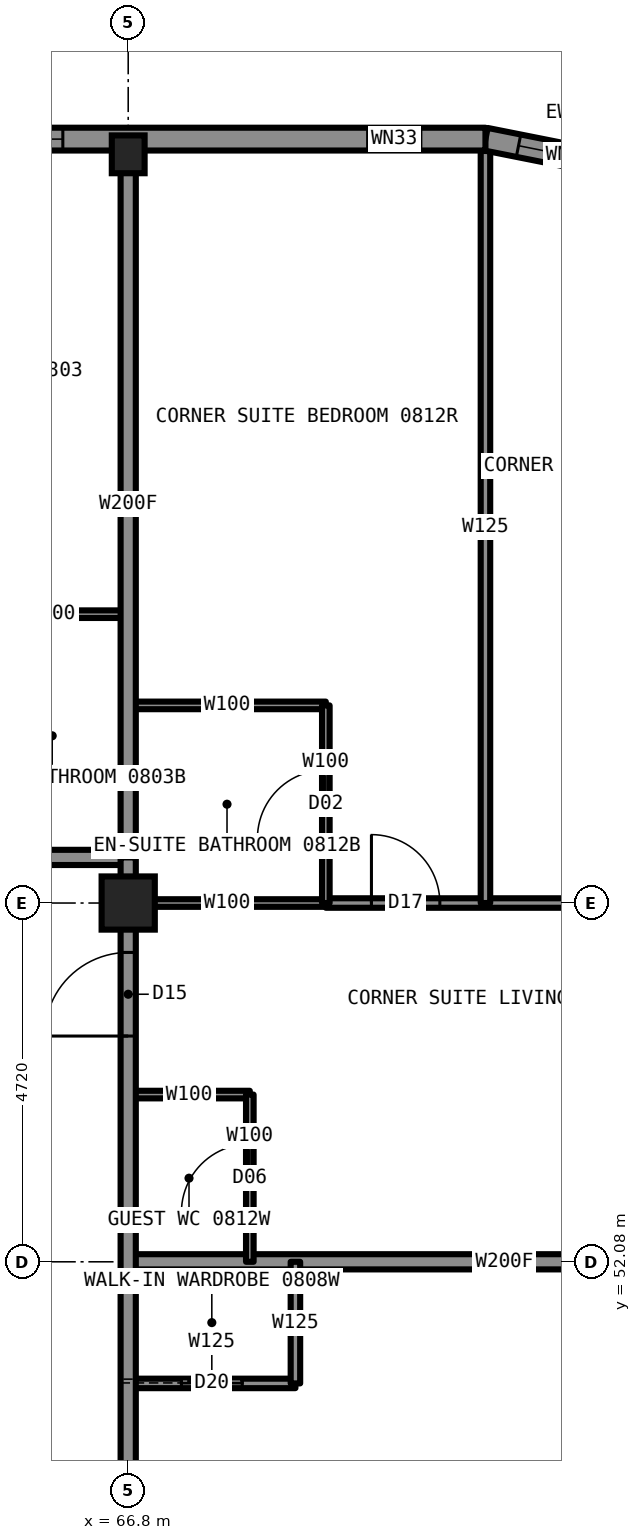
"""IFC4 building model, lengths in metres.
Left out: names, types, materials, properties, quantities, classifications, styles, units other than length and angle.
Written with IfcOpenShell. Run it as: python <this file> out.ifc"""

import sys

from ifc_helpers import new_model, si_unit, direction, frame, frame_2d, origin, origin_2d, place, context, subcontext, project, spatial, rectangle, hollow_rectangle, i_section, extrude, element, fill, save


model = new_model("IFC4")
c1 = context("Model", 3, precision=1e-05, world=origin(), true_north=direction((0.0, 1.0)))
c2 = subcontext(c1, "Body", "Model", "MODEL_VIEW")
j1 = project(units=[si_unit("LENGTHUNIT", "METRE"), si_unit("PLANEANGLEUNIT", "RADIAN")], contexts=[c1])
p1 = place(None, origin())
s1 = spatial("IfcSite", under=j1, at=p1, CompositionType="ELEMENT")
p2 = place(p1, origin())
s2 = spatial("IfcBuilding", under=s1, at=p2, CompositionType="ELEMENT")
p3 = place(p2, frame((0.0, 0.0, 28.5)))
s3 = spatial("IfcBuildingStorey", under=s2, at=p3, CompositionType="ELEMENT", Elevation=28.5)
p4 = place(p3, frame((66.8, 66.65, 0.0), z_axis=(0.0, 0.0, 1.0), x_axis=(1.0, 0.0, 0.0)))
e1 = element("IfcColumn", 1, at=p4, inside=s3, PredefinedType="COLUMN", context=c2, shape_type="SweptSolid", body=[
    extrude(i_section(OverallWidth=0.432, OverallDepth=0.498, WebThickness=0.056, FlangeThickness=0.089, at=origin_2d()), origin(), (0.0, 0.0, 1.0), 3.5),
])
p5 = place(p3, frame((66.8, 56.8, 0.0), z_axis=(0.0, 0.0, 1.0), x_axis=(1.0, 0.0, 0.0)))
e2 = element("IfcColumn", 2, at=p5, inside=s3, PredefinedType="COLUMN", context=c2, shape_type="SweptSolid", body=[
    extrude(hollow_rectangle(XDim=0.7, YDim=0.7, WallThickness=0.06, at=origin_2d()), origin(), (0.0, 0.0, 1.0), 3.5),
])
p6 = place(p3, frame((66.8, 56.8, 0.0), z_axis=(0.0, 0.0, 1.0), x_axis=(1.0, 0.0, 0.0)))
e3 = element("IfcWall", 3, at=p6, inside=s3, PredefinedType="PARTITIONING", context=c2, shape_type="SweptSolid", body=[
    extrude(rectangle(XDim=2.6, YDim=0.1, at=frame_2d((1.3, 0.0))), origin(), (0.0, 0.0, 1.0), 2.573),
])
p7 = place(p3, frame((69.4, 56.8, 0.0), z_axis=(0.0, 0.0, 1.0), x_axis=(1.0, 0.0, 0.0)))
e4 = element("IfcWall", 4, at=p7, inside=s3, PredefinedType="PARTITIONING", context=c2, shape_type="SweptSolid", body=[
    extrude(rectangle(XDim=7.3, YDim=0.125, at=frame_2d((3.65, 0.0))), origin(), (0.0, 0.0, 1.0), 2.573),
])
p8 = place(p7, frame((0.6, 0.0, 0.0)))
e5 = element("IfcOpeningElement", 5, at=p8, cuts=e4, PredefinedType="OPENING", context=c2, shape_type="SweptSolid", body=[
    extrude(rectangle(XDim=0.9, YDim=2.2, at=frame_2d((0.45, 1.1))), frame((0.0, 0.073, 0.0), z_axis=(0.0, -1.0, 0.0), x_axis=(1.0, 0.0, 0.0)), (0.0, 0.0, 1.0), 0.145),
])
p9 = place(p7, frame((4.4, 0.0, 0.0)))
e6 = element("IfcOpeningElement", 6, at=p9, cuts=e4, PredefinedType="OPENING", context=c2, shape_type="SweptSolid", body=[
    extrude(rectangle(XDim=0.9, YDim=2.2, at=frame_2d((0.45, 1.1))), frame((0.0, 0.073, 0.0), z_axis=(0.0, -1.0, 0.0), x_axis=(1.0, 0.0, 0.0)), (0.0, 0.0, 1.0), 0.145),
])
p10 = place(p3, frame((43.2, 57.4, 0.0), z_axis=(0.0, 0.0, 1.0), x_axis=(1.0, 0.0, 0.0)))
e7 = element("IfcWall", 7, at=p10, inside=s3, PredefinedType="PARTITIONING", context=c2, shape_type="SweptSolid", body=[
    extrude(rectangle(XDim=23.6, YDim=0.2, at=frame_2d((11.8, 0.0))), origin(), (0.0, 0.0, 1.0), 3.33),
])
p11 = place(p10, frame((1.85, 0.0, 0.0)))
e8 = element("IfcOpeningElement", 8, at=p11, cuts=e7, PredefinedType="OPENING", context=c2, shape_type="SweptSolid", body=[
    extrude(rectangle(XDim=1.1, YDim=2.2, at=frame_2d((0.55, 1.1))), frame((0.0, 0.11, 0.0), z_axis=(0.0, -1.0, 0.0), x_axis=(1.0, 0.0, 0.0)), (0.0, 0.0, 1.0), 0.22),
])
p12 = place(p10, frame((15.62, 0.0, 0.0)))
e9 = element("IfcOpeningElement", 9, at=p12, cuts=e7, PredefinedType="OPENING", context=c2, shape_type="SweptSolid", body=[
    extrude(rectangle(XDim=1.0, YDim=2.2, at=frame_2d((0.5, 1.1))), frame((0.0, 0.11, 0.0), z_axis=(0.0, -1.0, 0.0), x_axis=(1.0, 0.0, 0.0)), (0.0, 0.0, 1.0), 0.22),
])
p13 = place(p10, frame((20.34, 0.0, 0.0)))
e10 = element("IfcOpeningElement", 10, at=p13, cuts=e7, PredefinedType="OPENING", context=c2, shape_type="SweptSolid", body=[
    extrude(rectangle(XDim=1.0, YDim=2.2, at=frame_2d((0.5, 1.1))), frame((0.0, 0.11, 0.0), z_axis=(0.0, -1.0, 0.0), x_axis=(1.0, 0.0, 0.0)), (0.0, 0.0, 1.0), 0.22),
])
p14 = place(p3, frame((66.8, 59.4, 0.0), z_axis=(0.0, 0.0, 1.0), x_axis=(1.0, 0.0, 0.0)))
e11 = element("IfcWall", 11, at=p14, inside=s3, PredefinedType="PARTITIONING", context=c2, shape_type="SweptSolid", body=[
    extrude(rectangle(XDim=2.6, YDim=0.1, at=frame_2d((1.3, 0.0))), origin(), (0.0, 0.0, 1.0), 3.33),
])
p15 = place(p3, frame((64.8, 60.6, 0.0), z_axis=(0.0, 0.0, 1.0), x_axis=(1.0, 0.0, 0.0)))
e12 = element("IfcWall", 12, at=p15, inside=s3, PredefinedType="PARTITIONING", context=c2, shape_type="SweptSolid", body=[
    extrude(rectangle(XDim=2.0, YDim=0.1, at=frame_2d((1.0, 0.0))), origin(), (0.0, 0.0, 1.0), 3.33),
])
p16 = place(p3, frame((66.8, 50.48, 0.0), z_axis=(0.0, 0.0, 1.0), x_axis=(1.0, 0.0, 0.0)))
e13 = element("IfcWall", 13, at=p16, inside=s3, PredefinedType="PARTITIONING", context=c2, shape_type="SweptSolid", body=[
    extrude(rectangle(XDim=2.2, YDim=0.125, at=frame_2d((1.1, 0.0))), origin(), (0.0, 0.0, 1.0), 3.33),
])
p17 = place(p16, frame((0.7, 0.0, 0.0)))
e14 = element("IfcOpeningElement", 14, at=p17, cuts=e13, PredefinedType="OPENING", context=c2, shape_type="SweptSolid", body=[
    extrude(rectangle(XDim=0.8, YDim=2.1, at=frame_2d((0.4, 1.05))), frame((0.0, 0.073, 0.0), z_axis=(0.0, -1.0, 0.0), x_axis=(1.0, 0.0, 0.0)), (0.0, 0.0, 1.0), 0.145),
])
p18 = place(p3, frame((66.8, 52.08, 0.0), z_axis=(0.0, 0.0, 1.0), x_axis=(1.0, 0.0, 0.0)))
e15 = element("IfcWall", 15, at=p18, inside=s3, PredefinedType="PARTITIONING", context=c2, shape_type="SweptSolid", body=[
    extrude(rectangle(XDim=9.9, YDim=0.2, at=frame_2d((4.95, 0.0))), origin(), (0.0, 0.0, 1.0), 2.573),
])
p19 = place(p3, frame((66.8, 54.28, 0.0), z_axis=(0.0, 0.0, 1.0), x_axis=(1.0, 0.0, 0.0)))
e16 = element("IfcWall", 16, at=p19, inside=s3, PredefinedType="PARTITIONING", context=c2, shape_type="SweptSolid", body=[
    extrude(rectangle(XDim=1.6, YDim=0.1, at=frame_2d((0.8, 0.0))), origin(), (0.0, 0.0, 1.0), 2.723),
])
p20 = place(p3, frame((66.8, 33.22, 0.0), z_axis=(0.0, 0.0, 1.0), x_axis=(0.0, 1.0, 0.0)))
e17 = element("IfcWall", 17, at=p20, inside=s3, PredefinedType="PARTITIONING", context=c2, shape_type="SweptSolid", body=[
    extrude(rectangle(XDim=23.56, YDim=0.2, at=frame_2d((11.78, 0.0))), origin(), (0.0, 0.0, 1.0), 3.33),
])
p21 = place(p20, frame((7.85, 0.0, 0.0)))
e18 = element("IfcOpeningElement", 18, at=p21, cuts=e17, PredefinedType="OPENING", context=c2, shape_type="SweptSolid", body=[
    extrude(rectangle(XDim=1.0, YDim=2.2, at=frame_2d((0.5, 1.1))), frame((0.0, 0.11, 0.0), z_axis=(0.0, -1.0, 0.0), x_axis=(1.0, 0.0, 0.0)), (0.0, 0.0, 1.0), 0.22),
])
p22 = place(p20, frame((12.42, 0.0, 0.0)))
e19 = element("IfcOpeningElement", 19, at=p22, cuts=e17, PredefinedType="OPENING", context=c2, shape_type="SweptSolid", body=[
    extrude(rectangle(XDim=1.0, YDim=2.2, at=frame_2d((0.5, 1.1))), frame((0.0, 0.11, 0.0), z_axis=(0.0, -1.0, 0.0), x_axis=(1.0, 0.0, 0.0)), (0.0, 0.0, 1.0), 0.22),
])
p23 = place(p20, frame((21.83, 0.0, 0.0)))
e20 = element("IfcOpeningElement", 20, at=p23, cuts=e17, PredefinedType="OPENING", context=c2, shape_type="SweptSolid", body=[
    extrude(rectangle(XDim=1.1, YDim=2.2, at=frame_2d((0.55, 1.1))), frame((0.0, 0.11, 0.0), z_axis=(0.0, -1.0, 0.0), x_axis=(1.0, 0.0, 0.0)), (0.0, 0.0, 1.0), 0.22),
])
p24 = place(p20, frame((0.63, 0.0, 0.0)))
e21 = element("IfcOpeningElement", 21, at=p24, cuts=e17, PredefinedType="OPENING", context=c2, shape_type="SweptSolid", body=[
    extrude(rectangle(XDim=1.1, YDim=2.2, at=frame_2d((0.55, 1.1))), frame((0.0, 0.11, 0.0), z_axis=(0.0, -1.0, 0.0), x_axis=(1.0, 0.0, 0.0)), (0.0, 0.0, 1.0), 0.22),
])
p25 = place(p3, frame((66.8, 57.4, 0.0), z_axis=(0.0, 0.0, 1.0), x_axis=(0.0, 1.0, 0.0)))
e22 = element("IfcWall", 22, at=p25, inside=s3, PredefinedType="PARTITIONING", context=c2, shape_type="SweptSolid", body=[
    extrude(rectangle(XDim=9.3, YDim=0.2, at=frame_2d((4.65, 0.0))), origin(), (0.0, 0.0, 1.0), 2.573),
])
p26 = place(p3, frame((68.4, 52.08, 0.0), z_axis=(0.0, 0.0, 1.0), x_axis=(0.0, 1.0, 0.0)))
e23 = element("IfcWall", 23, at=p26, inside=s3, PredefinedType="PARTITIONING", context=c2, shape_type="SweptSolid", body=[
    extrude(rectangle(XDim=2.2, YDim=0.1, at=frame_2d((1.1, 0.0))), origin(), (0.0, 0.0, 1.0), 3.33),
])
p27 = place(p26, frame((0.65, 0.0, 0.0)))
e24 = element("IfcOpeningElement", 24, at=p27, cuts=e23, PredefinedType="OPENING", context=c2, shape_type="SweptSolid", body=[
    extrude(rectangle(XDim=0.9, YDim=2.1, at=frame_2d((0.45, 1.05))), frame((0.0, 0.06, 0.0), z_axis=(0.0, -1.0, 0.0), x_axis=(1.0, 0.0, 0.0)), (0.0, 0.0, 1.0), 0.12),
])
p28 = place(p3, frame((69.0, 50.48, 0.0), z_axis=(0.0, 0.0, 1.0), x_axis=(0.0, 1.0, 0.0)))
e25 = element("IfcWall", 25, at=p28, inside=s3, PredefinedType="PARTITIONING", context=c2, shape_type="SweptSolid", body=[
    extrude(rectangle(XDim=1.6, YDim=0.125, at=frame_2d((0.8, 0.0))), origin(), (0.0, 0.0, 1.0), 3.33),
])
p29 = place(p3, frame((69.4, 56.8, 0.0), z_axis=(0.0, 0.0, 1.0), x_axis=(0.0, 1.0, 0.0)))
e26 = element("IfcWall", 26, at=p29, inside=s3, PredefinedType="PARTITIONING", context=c2, shape_type="SweptSolid", body=[
    extrude(rectangle(XDim=2.6, YDim=0.1, at=frame_2d((1.3, 0.0))), origin(), (0.0, 0.0, 1.0), 3.33),
])
p30 = place(p29, frame((0.85, 0.0, 0.0)))
e27 = element("IfcOpeningElement", 27, at=p30, cuts=e26, PredefinedType="OPENING", context=c2, shape_type="SweptSolid", body=[
    extrude(rectangle(XDim=0.9, YDim=2.1, at=frame_2d((0.45, 1.05))), frame((0.0, 0.06, 0.0), z_axis=(0.0, -1.0, 0.0), x_axis=(1.0, 0.0, 0.0)), (0.0, 0.0, 1.0), 0.12),
])
p31 = place(p3, frame((71.5, 56.8, 0.0), z_axis=(0.0, 0.0, 1.0), x_axis=(0.0, 1.0, 0.0)))
e28 = element("IfcWall", 28, at=p31, inside=s3, PredefinedType="PARTITIONING", context=c2, shape_type="SweptSolid", body=[
    extrude(rectangle(XDim=9.894, YDim=0.125, at=frame_2d((4.947, 0.0))), origin(), (0.0, 0.0, 1.0), 3.33),
])
p32 = place(p3, frame((73.547, 66.443, 0.0), z_axis=(0.0, 0.0, 1.0), x_axis=(-0.980787050784, 0.195081421501, 0.0)))
e29 = element("IfcWall", 29, at=p32, inside=s3, PredefinedType="SOLIDWALL", context=c2, shape_type="SweptSolid", body=[
    extrude(rectangle(XDim=2.087, YDim=0.3, at=frame_2d((1.044, 0.0))), origin(), (0.0, 0.0, 1.0), 3.33),
])
p33 = place(p32, frame((0.844, 0.0, 0.5)))
e30 = element("IfcOpeningElement", 30, at=p33, cuts=e29, PredefinedType="OPENING", context=c2, shape_type="SweptSolid", body=[
    extrude(rectangle(XDim=0.8, YDim=1.1, at=frame_2d((0.4, 0.55))), frame((0.0, 0.16, 0.0), z_axis=(0.0, -1.0, 0.0), x_axis=(1.0, 0.0, 0.0)), (0.0, 0.0, 1.0), 0.32),
])
p34 = place(p3, frame((71.5, 66.85, 0.0), z_axis=(0.0, 0.0, 1.0), x_axis=(-1.0, 0.0, 0.0)))
e31 = element("IfcWall", 31, at=p34, inside=s3, PredefinedType="SOLIDWALL", context=c2, shape_type="SweptSolid", body=[
    extrude(rectangle(XDim=33.0, YDim=0.3, at=frame_2d((16.5, 0.0))), origin(), (0.0, 0.0, 1.0), 2.83),
])
p35 = place(p34, frame((0.85, 0.0, 0.5)))
e32 = element("IfcOpeningElement", 32, at=p35, cuts=e31, PredefinedType="OPENING", context=c2, shape_type="SweptSolid", body=[
    extrude(rectangle(XDim=3.0, YDim=2.0, at=frame_2d((1.5, 1.0))), frame((0.0, 0.16, 0.0), z_axis=(0.0, -1.0, 0.0), x_axis=(1.0, 0.0, 0.0)), (0.0, 0.0, 1.0), 0.32),
])
p36 = place(p34, frame((5.56, 0.0, 0.5)))
e33 = element("IfcOpeningElement", 33, at=p36, cuts=e31, PredefinedType="OPENING", context=c2, shape_type="SweptSolid", body=[
    extrude(rectangle(XDim=3.0, YDim=2.0, at=frame_2d((1.5, 1.0))), frame((0.0, 0.16, 0.0), z_axis=(0.0, -1.0, 0.0), x_axis=(1.0, 0.0, 0.0)), (0.0, 0.0, 1.0), 0.32),
])
p37 = place(p34, frame((10.28, 0.0, 0.5)))
e34 = element("IfcOpeningElement", 34, at=p37, cuts=e31, PredefinedType="OPENING", context=c2, shape_type="SweptSolid", body=[
    extrude(rectangle(XDim=3.0, YDim=2.0, at=frame_2d((1.5, 1.0))), frame((0.0, 0.16, 0.0), z_axis=(0.0, -1.0, 0.0), x_axis=(1.0, 0.0, 0.0)), (0.0, 0.0, 1.0), 0.32),
])
p38 = place(p34, frame((15.0, 0.0, 0.5)))
e35 = element("IfcOpeningElement", 35, at=p38, cuts=e31, PredefinedType="OPENING", context=c2, shape_type="SweptSolid", body=[
    extrude(rectangle(XDim=3.0, YDim=2.0, at=frame_2d((1.5, 1.0))), frame((0.0, 0.16, 0.0), z_axis=(0.0, -1.0, 0.0), x_axis=(1.0, 0.0, 0.0)), (0.0, 0.0, 1.0), 0.32),
])
p39 = place(p34, frame((19.72, 0.0, 0.5)))
e36 = element("IfcOpeningElement", 36, at=p39, cuts=e31, PredefinedType="OPENING", context=c2, shape_type="SweptSolid", body=[
    extrude(rectangle(XDim=3.0, YDim=2.0, at=frame_2d((1.5, 1.0))), frame((0.0, 0.16, 0.0), z_axis=(0.0, -1.0, 0.0), x_axis=(1.0, 0.0, 0.0)), (0.0, 0.0, 1.0), 0.32),
])
p40 = place(p34, frame((24.44, 0.0, 0.5)))
e37 = element("IfcOpeningElement", 37, at=p40, cuts=e31, PredefinedType="OPENING", context=c2, shape_type="SweptSolid", body=[
    extrude(rectangle(XDim=3.0, YDim=2.0, at=frame_2d((1.5, 1.0))), frame((0.0, 0.16, 0.0), z_axis=(0.0, -1.0, 0.0), x_axis=(1.0, 0.0, 0.0)), (0.0, 0.0, 1.0), 0.32),
])
p41 = place(p34, frame((29.15, 0.0, 0.5)))
e38 = element("IfcOpeningElement", 38, at=p41, cuts=e31, PredefinedType="OPENING", context=c2, shape_type="SweptSolid", body=[
    extrude(rectangle(XDim=3.0, YDim=2.0, at=frame_2d((1.5, 1.0))), frame((0.0, 0.16, 0.0), z_axis=(0.0, -1.0, 0.0), x_axis=(1.0, 0.0, 0.0)), (0.0, 0.0, 1.0), 0.32),
])
p42 = place(p3, frame((66.8, 56.78, 0.0), z_axis=(0.0, 0.0, 1.0), x_axis=(0.0, 1.0, 0.0)))
e39 = element("IfcWall", 39, at=p42, inside=s3, PredefinedType="PARTITIONING", context=c2, shape_type="SweptSolid", body=[
    extrude(rectangle(XDim=0.62, YDim=0.2, at=frame_2d((0.31, 0.0))), origin(), (0.0, 0.0, 1.0), 2.573),
])
p43 = place(p17, origin())
e40 = element("IfcDoor", 40, at=p43, inside=s3, OperationType="SLIDING_TO_LEFT", PredefinedType="DOOR", context=c2, shape_type="SweptSolid", body=[
    extrude(rectangle(XDim=0.8, YDim=2.1, at=frame_2d((0.4, 1.05))), frame((0.0, 0.025, 0.0), z_axis=(0.0, -1.0, 0.0), x_axis=(1.0, 0.0, 0.0)), (0.0, 0.0, 1.0), 0.05),
])
fill(e14, e40)
p44 = place(p23, origin())
e41 = element("IfcDoor", 41, at=p44, inside=s3, OperationType="SINGLE_SWING_LEFT", PredefinedType="DOOR", context=c2, shape_type="SweptSolid", body=[
    extrude(rectangle(XDim=1.1, YDim=2.2, at=frame_2d((0.55, 1.1))), frame((0.0, 0.025, 0.0), z_axis=(0.0, -1.0, 0.0), x_axis=(1.0, 0.0, 0.0)), (0.0, 0.0, 1.0), 0.05),
])
fill(e20, e41)
p45 = place(p30, origin())
e42 = element("IfcDoor", 42, at=p45, inside=s3, OperationType="SINGLE_SWING_RIGHT", PredefinedType="DOOR", context=c2, shape_type="SweptSolid", body=[
    extrude(rectangle(XDim=0.9, YDim=2.1, at=frame_2d((0.45, 1.05))), frame((0.0, 0.025, 0.0), z_axis=(0.0, -1.0, 0.0), x_axis=(1.0, 0.0, 0.0)), (0.0, 0.0, 1.0), 0.05),
])
fill(e27, e42)
p46 = place(p8, origin())
e43 = element("IfcDoor", 43, at=p46, inside=s3, OperationType="SINGLE_SWING_LEFT", PredefinedType="DOOR", context=c2, shape_type="SweptSolid", body=[
    extrude(rectangle(XDim=0.9, YDim=2.2, at=frame_2d((0.45, 1.1))), frame((0.0, 0.025, 0.0), z_axis=(0.0, -1.0, 0.0), x_axis=(1.0, 0.0, 0.0)), (0.0, 0.0, 1.0), 0.05),
])
fill(e5, e43)
p47 = place(p27, origin())
e44 = element("IfcDoor", 44, at=p47, inside=s3, OperationType="SINGLE_SWING_LEFT", PredefinedType="DOOR", context=c2, shape_type="SweptSolid", body=[
    extrude(rectangle(XDim=0.9, YDim=2.1, at=frame_2d((0.45, 1.05))), frame((0.0, 0.025, 0.0), z_axis=(0.0, -1.0, 0.0), x_axis=(1.0, 0.0, 0.0)), (0.0, 0.0, 1.0), 0.05),
])
fill(e24, e44)
p48 = place(p33, origin())
e45 = element("IfcWindow", 45, at=p48, inside=s3, PartitioningType="SINGLE_PANEL", PredefinedType="WINDOW", context=c2, shape_type="SweptSolid", body=[
    extrude(rectangle(XDim=0.8, YDim=1.1, at=frame_2d((0.4, 0.55))), frame((0.0, 0.03, 0.0), z_axis=(0.0, -1.0, 0.0), x_axis=(1.0, 0.0, 0.0)), (0.0, 0.0, 1.0), 0.06),
])
fill(e30, e45)
p49 = place(p35, origin())
e46 = element("IfcWindow", 46, at=p49, inside=s3, PartitioningType="SINGLE_PANEL", PredefinedType="WINDOW", context=c2, shape_type="SweptSolid", body=[
    extrude(rectangle(XDim=3.0, YDim=2.0, at=frame_2d((1.5, 1.0))), frame((0.0, 0.03, 0.0), z_axis=(0.0, -1.0, 0.0), x_axis=(1.0, 0.0, 0.0)), (0.0, 0.0, 1.0), 0.06),
])
fill(e32, e46)
p50 = place(p36, origin())
e47 = element("IfcWindow", 47, at=p50, inside=s3, PartitioningType="SINGLE_PANEL", PredefinedType="WINDOW", context=c2, shape_type="SweptSolid", body=[
    extrude(rectangle(XDim=3.0, YDim=2.0, at=frame_2d((1.5, 1.0))), frame((0.0, 0.03, 0.0), z_axis=(0.0, -1.0, 0.0), x_axis=(1.0, 0.0, 0.0)), (0.0, 0.0, 1.0), 0.06),
])
fill(e33, e47)
save(model, sys.argv[1])
